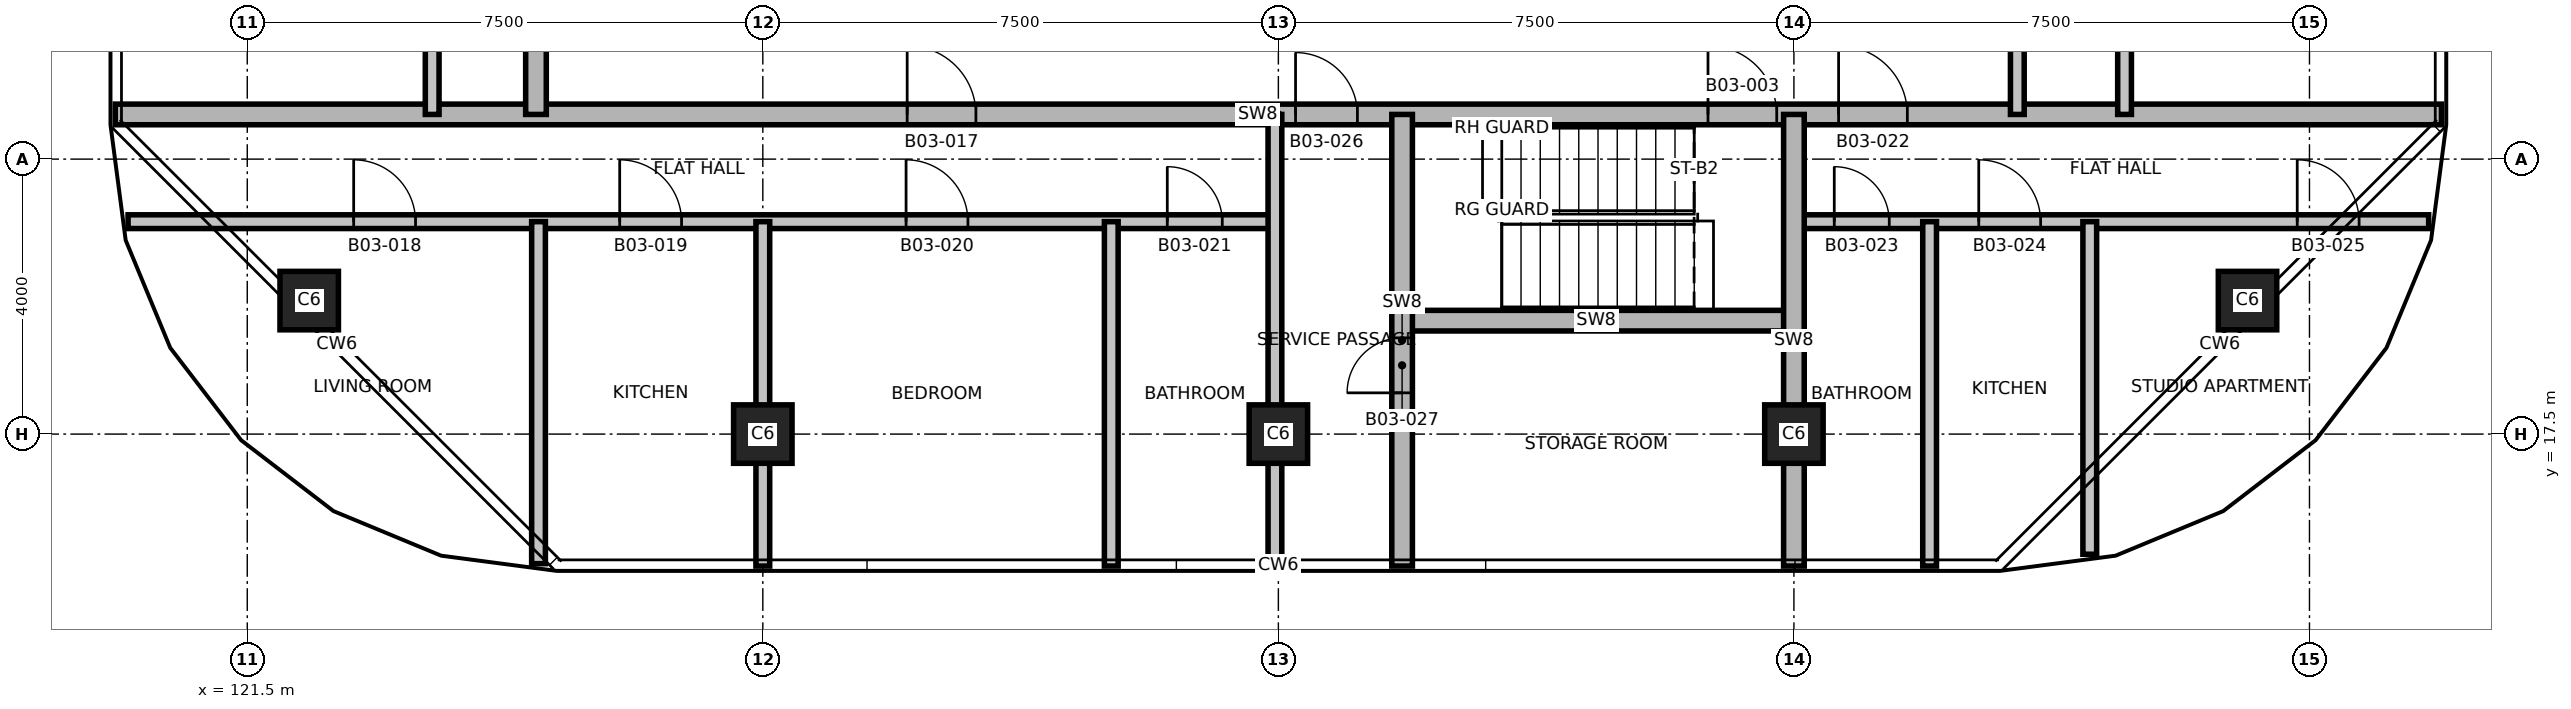
"""IFC4 building model, lengths in metres.
Left out: names, types, materials, properties, quantities, classifications, styles, units other than length and angle.
Written with IfcOpenShell. Run it as: python <this file> out.ifc"""

import sys

from ifc_helpers import new_model, si_unit, direction, frame, frame_2d, origin, origin_2d, place, context, subcontext, project, spatial, rectangle, extrude, element, fill, save


model = new_model("IFC4")
c1 = context("Model", 3, precision=1e-05, world=origin(), true_north=direction((0.0, 1.0)))
c2 = subcontext(c1, "Body", "Model", "MODEL_VIEW")
j1 = project(units=[si_unit("LENGTHUNIT", "METRE"), si_unit("PLANEANGLEUNIT", "RADIAN")], contexts=[c1])
p1 = place(None, origin())
s1 = spatial("IfcSite", under=j1, at=p1, CompositionType="ELEMENT")
p2 = place(p1, origin())
s2 = spatial("IfcBuilding", under=s1, at=p2, CompositionType="ELEMENT")
p3 = place(p2, frame((0.0, 0.0, 59.4)))
s3 = spatial("IfcBuildingStorey", under=s2, at=p3, CompositionType="ELEMENT", Elevation=59.4)
for number, where, z_axis, x_axis in (
    (1, (129.0, 17.5, 0.0), (0.0, 0.0, 1.0), (1.0, 0.0, 0.0)),
    (2, (136.5, 17.5, 0.0), (0.0, 0.0, 1.0), (1.0, 0.0, 0.0)),
    (3, (144.0, 17.5, 0.0), (0.0, 0.0, 1.0), (1.0, 0.0, 0.0)),
    (4, (122.401, 19.442, 0.0), (0.0, 0.0, 1.0), (1.0, 0.0, 0.0)),
    (5, (150.599, 19.442, 0.0), (0.0, 0.0, 1.0), (1.0, 0.0, 0.0)),
):
    element("IfcColumn", number, at=place(p3, frame(where, z_axis=z_axis, x_axis=x_axis)), inside=s3, PredefinedType="COLUMN", context=c2, shape_type="SweptSolid", body=[
        extrude(rectangle(XDim=0.85, YDim=0.85, at=origin_2d()), origin(), (0.0, 0.0, 1.0), 3.7),
    ])
p4 = place(p3, frame((138.25, 19.15, 0.0), z_axis=(0.0, 0.0, 1.0), x_axis=(1.0, 0.0, 0.0)))
e6 = element("IfcWall", 6, at=p4, inside=s3, PredefinedType="SHEAR", context=c2, shape_type="SweptSolid", body=[
    extrude(rectangle(XDim=5.75, YDim=0.3, at=frame_2d((2.875, 0.0))), origin(), (0.0, 0.0, 1.0), 3.4),
])
p5 = place(p3, frame((119.766, 20.59, 0.0), z_axis=(0.0, 0.0, 1.0), x_axis=(1.0, 0.0, 0.0)))
e7 = element("IfcWall", 7, at=p5, inside=s3, PredefinedType="PARTITIONING", context=c2, shape_type="SweptSolid", body=[
    extrude(rectangle(XDim=16.734, YDim=0.2, at=frame_2d((8.367, 0.0))), origin(), (0.0, 0.0, 1.0), 3.4),
])
p6 = place(p5, frame((3.282, 0.0, 0.0)))
e8 = element("IfcOpeningElement", 8, at=p6, cuts=e7, PredefinedType="OPENING", context=c2, shape_type="SweptSolid", body=[
    extrude(rectangle(XDim=0.9, YDim=2.1, at=frame_2d((0.45, 1.05))), frame((0.0, 0.11, 0.0), z_axis=(0.0, -1.0, 0.0), x_axis=(1.0, 0.0, 0.0)), (0.0, 0.0, 1.0), 0.22),
])
p7 = place(p5, frame((7.152, 0.0, 0.0)))
e9 = element("IfcOpeningElement", 9, at=p7, cuts=e7, PredefinedType="OPENING", context=c2, shape_type="SweptSolid", body=[
    extrude(rectangle(XDim=0.9, YDim=2.1, at=frame_2d((0.45, 1.05))), frame((0.0, 0.11, 0.0), z_axis=(0.0, -1.0, 0.0), x_axis=(1.0, 0.0, 0.0)), (0.0, 0.0, 1.0), 0.22),
])
p8 = place(p5, frame((11.318, 0.0, 0.0)))
e10 = element("IfcOpeningElement", 10, at=p8, cuts=e7, PredefinedType="OPENING", context=c2, shape_type="SweptSolid", body=[
    extrude(rectangle(XDim=0.9, YDim=2.1, at=frame_2d((0.45, 1.05))), frame((0.0, 0.11, 0.0), z_axis=(0.0, -1.0, 0.0), x_axis=(1.0, 0.0, 0.0)), (0.0, 0.0, 1.0), 0.22),
])
p9 = place(p5, frame((15.118, 0.0, 0.0)))
e11 = element("IfcOpeningElement", 11, at=p9, cuts=e7, PredefinedType="OPENING", context=c2, shape_type="SweptSolid", body=[
    extrude(rectangle(XDim=0.8, YDim=2.1, at=frame_2d((0.4, 1.05))), frame((0.0, 0.11, 0.0), z_axis=(0.0, -1.0, 0.0), x_axis=(1.0, 0.0, 0.0)), (0.0, 0.0, 1.0), 0.22),
])
p10 = place(p3, frame((144.0, 20.59, 0.0), z_axis=(0.0, 0.0, 1.0), x_axis=(1.0, 0.0, 0.0)))
e12 = element("IfcWall", 12, at=p10, inside=s3, PredefinedType="PARTITIONING", context=c2, shape_type="SweptSolid", body=[
    extrude(rectangle(XDim=9.234, YDim=0.2, at=frame_2d((4.617, 0.0))), origin(), (0.0, 0.0, 1.0), 3.4),
])
p11 = place(p10, frame((0.587, 0.0, 0.0)))
e13 = element("IfcOpeningElement", 13, at=p11, cuts=e12, PredefinedType="OPENING", context=c2, shape_type="SweptSolid", body=[
    extrude(rectangle(XDim=0.8, YDim=2.1, at=frame_2d((0.4, 1.05))), frame((0.0, 0.11, 0.0), z_axis=(0.0, -1.0, 0.0), x_axis=(1.0, 0.0, 0.0)), (0.0, 0.0, 1.0), 0.22),
])
p12 = place(p10, frame((2.689, 0.0, 0.0)))
e14 = element("IfcOpeningElement", 14, at=p12, cuts=e12, PredefinedType="OPENING", context=c2, shape_type="SweptSolid", body=[
    extrude(rectangle(XDim=0.9, YDim=2.1, at=frame_2d((0.45, 1.05))), frame((0.0, 0.11, 0.0), z_axis=(0.0, -1.0, 0.0), x_axis=(1.0, 0.0, 0.0)), (0.0, 0.0, 1.0), 0.22),
])
p13 = place(p10, frame((7.322, 0.0, 0.0)))
e15 = element("IfcOpeningElement", 15, at=p13, cuts=e12, PredefinedType="OPENING", context=c2, shape_type="SweptSolid", body=[
    extrude(rectangle(XDim=0.9, YDim=2.1, at=frame_2d((0.45, 1.05))), frame((0.0, 0.11, 0.0), z_axis=(0.0, -1.0, 0.0), x_axis=(1.0, 0.0, 0.0)), (0.0, 0.0, 1.0), 0.22),
])
p14 = place(p3, frame((119.58, 22.15, 0.0), z_axis=(0.0, 0.0, 1.0), x_axis=(1.0, 0.0, 0.0)))
e16 = element("IfcWall", 16, at=p14, inside=s3, PredefinedType="SHEAR", context=c2, shape_type="SweptSolid", body=[
    extrude(rectangle(XDim=33.84, YDim=0.3, at=frame_2d((16.92, 0.0))), origin(), (0.0, 0.0, 1.0), 3.4),
])
p15 = place(p14, frame((23.17, 0.0, 0.0)))
e17 = element("IfcOpeningElement", 17, at=p15, cuts=e16, PredefinedType="OPENING", context=c2, shape_type="SweptSolid", body=[
    extrude(rectangle(XDim=1.0, YDim=2.1, at=frame_2d((0.5, 1.05))), frame((0.0, 0.16, 0.0), z_axis=(0.0, -1.0, 0.0), x_axis=(1.0, 0.0, 0.0)), (0.0, 0.0, 1.0), 0.32),
])
p16 = place(p14, frame((11.52, 0.0, 0.0)))
e18 = element("IfcOpeningElement", 18, at=p16, cuts=e16, PredefinedType="OPENING", context=c2, shape_type="SweptSolid", body=[
    extrude(rectangle(XDim=1.0, YDim=2.1, at=frame_2d((0.5, 1.05))), frame((0.0, 0.16, 0.0), z_axis=(0.0, -1.0, 0.0), x_axis=(1.0, 0.0, 0.0)), (0.0, 0.0, 1.0), 0.32),
])
p17 = place(p14, frame((25.07, 0.0, 0.0)))
e19 = element("IfcOpeningElement", 19, at=p17, cuts=e16, PredefinedType="OPENING", context=c2, shape_type="SweptSolid", body=[
    extrude(rectangle(XDim=1.0, YDim=2.1, at=frame_2d((0.5, 1.05))), frame((0.0, 0.16, 0.0), z_axis=(0.0, -1.0, 0.0), x_axis=(1.0, 0.0, 0.0)), (0.0, 0.0, 1.0), 0.32),
])
p18 = place(p14, frame((17.17, 0.0, 0.0)))
e20 = element("IfcOpeningElement", 20, at=p18, cuts=e16, PredefinedType="OPENING", context=c2, shape_type="SweptSolid", body=[
    extrude(rectangle(XDim=0.9, YDim=2.1, at=frame_2d((0.45, 1.05))), frame((0.0, 0.16, 0.0), z_axis=(0.0, -1.0, 0.0), x_axis=(1.0, 0.0, 0.0)), (0.0, 0.0, 1.0), 0.32),
])
p19 = place(p3, frame((124.19, 22.15, 0.0), z_axis=(0.0, 0.0, 1.0), x_axis=(0.0, 1.0, 0.0)))
e21 = element("IfcWall", 21, at=p19, inside=s3, PredefinedType="PARTITIONING", context=c2, shape_type="SweptSolid", body=[
    extrude(rectangle(XDim=17.7, YDim=0.2, at=frame_2d((8.85, 0.0))), origin(), (0.0, 0.0, 1.0), 3.4),
])
p20 = place(p19, frame((1.028, 0.0, 0.0)))
e22 = element("IfcOpeningElement", 22, at=p20, cuts=e21, PredefinedType="OPENING", context=c2, shape_type="SweptSolid", body=[
    extrude(rectangle(XDim=0.9, YDim=2.1, at=frame_2d((0.45, 1.05))), frame((0.0, 0.11, 0.0), z_axis=(0.0, -1.0, 0.0), x_axis=(1.0, 0.0, 0.0)), (0.0, 0.0, 1.0), 0.22),
])
p21 = place(p19, frame((3.253, 0.0, 0.0)))
e23 = element("IfcOpeningElement", 23, at=p21, cuts=e21, PredefinedType="OPENING", context=c2, shape_type="SweptSolid", body=[
    extrude(rectangle(XDim=0.8, YDim=2.1, at=frame_2d((0.4, 1.05))), frame((0.0, 0.11, 0.0), z_axis=(0.0, -1.0, 0.0), x_axis=(1.0, 0.0, 0.0)), (0.0, 0.0, 1.0), 0.22),
])
p22 = place(p19, frame((6.867, 0.0, 0.0)))
e24 = element("IfcOpeningElement", 24, at=p22, cuts=e21, PredefinedType="OPENING", context=c2, shape_type="SweptSolid", body=[
    extrude(rectangle(XDim=0.9, YDim=2.1, at=frame_2d((0.45, 1.05))), frame((0.0, 0.11, 0.0), z_axis=(0.0, -1.0, 0.0), x_axis=(1.0, 0.0, 0.0)), (0.0, 0.0, 1.0), 0.22),
])
p23 = place(p19, frame((11.367, 0.0, 0.0)))
e25 = element("IfcOpeningElement", 25, at=p23, cuts=e21, PredefinedType="OPENING", context=c2, shape_type="SweptSolid", body=[
    extrude(rectangle(XDim=0.9, YDim=2.1, at=frame_2d((0.45, 1.05))), frame((0.0, 0.11, 0.0), z_axis=(0.0, -1.0, 0.0), x_axis=(1.0, 0.0, 0.0)), (0.0, 0.0, 1.0), 0.22),
])
p24 = place(p19, frame((15.075, 0.0, 0.0)))
e26 = element("IfcOpeningElement", 26, at=p24, cuts=e21, PredefinedType="OPENING", context=c2, shape_type="SweptSolid", body=[
    extrude(rectangle(XDim=0.9, YDim=2.1, at=frame_2d((0.45, 1.05))), frame((0.0, 0.11, 0.0), z_axis=(0.0, -1.0, 0.0), x_axis=(1.0, 0.0, 0.0)), (0.0, 0.0, 1.0), 0.22),
])
p25 = place(p3, frame((125.7, 22.15, 0.0), z_axis=(0.0, 0.0, 1.0), x_axis=(0.0, 1.0, 0.0)))
e27 = element("IfcWall", 27, at=p25, inside=s3, PredefinedType="SHEAR", context=c2, shape_type="SweptSolid", body=[
    extrude(rectangle(XDim=17.7, YDim=0.3, at=frame_2d((8.85, 0.0))), origin(), (0.0, 0.0, 1.0), 3.4),
])
p26 = place(p25, frame((2.7, 0.0, 0.0)))
e28 = element("IfcOpeningElement", 28, at=p26, cuts=e27, PredefinedType="OPENING", context=c2, shape_type="SweptSolid", body=[
    extrude(rectangle(XDim=1.0, YDim=2.1, at=frame_2d((0.5, 1.05))), frame((0.0, 0.16, 0.0), z_axis=(0.0, -1.0, 0.0), x_axis=(1.0, 0.0, 0.0)), (0.0, 0.0, 1.0), 0.32),
])
p27 = place(p3, frame((125.737, 15.615, 0.0), z_axis=(0.0, 0.0, 1.0), x_axis=(0.0, 1.0, 0.0)))
e29 = element("IfcWall", 29, at=p27, inside=s3, PredefinedType="PARTITIONING", context=c2, shape_type="SweptSolid", body=[
    extrude(rectangle(XDim=4.975, YDim=0.2, at=frame_2d((2.488, 0.0))), origin(), (0.0, 0.0, 1.0), 3.4),
])
for number, where, z_axis, x_axis in (
    (30, (129.0, 15.58, 0.0), (0.0, 0.0, 1.0), (0.0, 1.0, 0.0)),
    (31, (134.069, 15.58, 0.0), (0.0, 0.0, 1.0), (0.0, 1.0, 0.0)),
):
    element("IfcWall", number, at=place(p3, frame(where, z_axis=z_axis, x_axis=x_axis)), inside=s3, PredefinedType="PARTITIONING", context=c2, shape_type="SweptSolid", body=[
        extrude(rectangle(XDim=5.01, YDim=0.2, at=frame_2d((2.505, 0.0))), origin(), (0.0, 0.0, 1.0), 3.4),
    ])
p28 = place(p3, frame((136.45, 15.58, 0.0), z_axis=(0.0, 0.0, 1.0), x_axis=(0.0, 1.0, 0.0)))
e32 = element("IfcWall", 32, at=p28, inside=s3, PredefinedType="PARTITIONING", context=c2, shape_type="SweptSolid", body=[
    extrude(rectangle(XDim=6.57, YDim=0.2, at=frame_2d((3.285, 0.0))), origin(), (0.0, 0.0, 1.0), 3.4),
])
p29 = place(p3, frame((138.3, 15.58, 0.0), z_axis=(0.0, 0.0, 1.0), x_axis=(0.0, 1.0, 0.0)))
e33 = element("IfcWall", 33, at=p29, inside=s3, PredefinedType="SHEAR", context=c2, shape_type="SweptSolid", body=[
    extrude(rectangle(XDim=6.57, YDim=0.3, at=frame_2d((3.285, 0.0))), origin(), (0.0, 0.0, 1.0), 3.4),
])
p30 = place(p29, frame((2.52, 0.0, 0.0)))
e34 = element("IfcOpeningElement", 34, at=p30, cuts=e33, PredefinedType="OPENING", context=c2, shape_type="SweptSolid", body=[
    extrude(rectangle(XDim=0.8, YDim=2.1, at=frame_2d((0.4, 1.05))), frame((0.0, 0.16, 0.0), z_axis=(0.0, -1.0, 0.0), x_axis=(1.0, 0.0, 0.0)), (0.0, 0.0, 1.0), 0.32),
])
p31 = place(p3, frame((144.0, 15.58, 0.0), z_axis=(0.0, 0.0, 1.0), x_axis=(0.0, 1.0, 0.0)))
e35 = element("IfcWall", 35, at=p31, inside=s3, PredefinedType="SHEAR", context=c2, shape_type="SweptSolid", body=[
    extrude(rectangle(XDim=6.57, YDim=0.3, at=frame_2d((3.285, 0.0))), origin(), (0.0, 0.0, 1.0), 3.4),
])
p32 = place(p3, frame((145.974, 15.58, 0.0), z_axis=(0.0, 0.0, 1.0), x_axis=(0.0, 1.0, 0.0)))
e36 = element("IfcWall", 36, at=p32, inside=s3, PredefinedType="PARTITIONING", context=c2, shape_type="SweptSolid", body=[
    extrude(rectangle(XDim=5.01, YDim=0.2, at=frame_2d((2.505, 0.0))), origin(), (0.0, 0.0, 1.0), 3.4),
])
p33 = place(p3, frame((147.25, 22.15, 0.0), z_axis=(0.0, 0.0, 1.0), x_axis=(0.0, 1.0, 0.0)))
e37 = element("IfcWall", 37, at=p33, inside=s3, PredefinedType="PARTITIONING", context=c2, shape_type="SweptSolid", body=[
    extrude(rectangle(XDim=17.7, YDim=0.2, at=frame_2d((8.85, 0.0))), origin(), (0.0, 0.0, 1.0), 3.4),
])
p34 = place(p33, frame((2.65, 0.0, 0.0)))
e38 = element("IfcOpeningElement", 38, at=p34, cuts=e37, PredefinedType="OPENING", context=c2, shape_type="SweptSolid", body=[
    extrude(rectangle(XDim=1.0, YDim=2.1, at=frame_2d((0.5, 1.05))), frame((0.0, 0.11, 0.0), z_axis=(0.0, -1.0, 0.0), x_axis=(1.0, 0.0, 0.0)), (0.0, 0.0, 1.0), 0.22),
])
p35 = place(p3, frame((148.304, 15.752, 0.0), z_axis=(0.0, 0.0, 1.0), x_axis=(0.0, 1.0, 0.0)))
e39 = element("IfcWall", 39, at=p35, inside=s3, PredefinedType="PARTITIONING", context=c2, shape_type="SweptSolid", body=[
    extrude(rectangle(XDim=4.838, YDim=0.2, at=frame_2d((2.419, 0.0))), origin(), (0.0, 0.0, 1.0), 3.4),
])
p36 = place(p3, frame((148.81, 22.15, 0.0), z_axis=(0.0, 0.0, 1.0), x_axis=(0.0, 1.0, 0.0)))
e40 = element("IfcWall", 40, at=p36, inside=s3, PredefinedType="PARTITIONING", context=c2, shape_type="SweptSolid", body=[
    extrude(rectangle(XDim=17.7, YDim=0.2, at=frame_2d((8.85, 0.0))), origin(), (0.0, 0.0, 1.0), 3.4),
])
p37 = place(p36, frame((1.725, 0.0, 0.0)))
e41 = element("IfcOpeningElement", 41, at=p37, cuts=e40, PredefinedType="OPENING", context=c2, shape_type="SweptSolid", body=[
    extrude(rectangle(XDim=0.9, YDim=2.1, at=frame_2d((0.45, 1.05))), frame((0.0, 0.11, 0.0), z_axis=(0.0, -1.0, 0.0), x_axis=(1.0, 0.0, 0.0)), (0.0, 0.0, 1.0), 0.22),
])
p38 = place(p36, frame((6.867, 0.0, 0.0)))
e42 = element("IfcOpeningElement", 42, at=p38, cuts=e40, PredefinedType="OPENING", context=c2, shape_type="SweptSolid", body=[
    extrude(rectangle(XDim=0.9, YDim=2.1, at=frame_2d((0.45, 1.05))), frame((0.0, 0.11, 0.0), z_axis=(0.0, -1.0, 0.0), x_axis=(1.0, 0.0, 0.0)), (0.0, 0.0, 1.0), 0.22),
])
p39 = place(p36, frame((11.367, 0.0, 0.0)))
e43 = element("IfcOpeningElement", 43, at=p39, cuts=e40, PredefinedType="OPENING", context=c2, shape_type="SweptSolid", body=[
    extrude(rectangle(XDim=0.9, YDim=2.1, at=frame_2d((0.45, 1.05))), frame((0.0, 0.11, 0.0), z_axis=(0.0, -1.0, 0.0), x_axis=(1.0, 0.0, 0.0)), (0.0, 0.0, 1.0), 0.22),
])
p40 = place(p36, frame((14.378, 0.0, 0.0)))
e44 = element("IfcOpeningElement", 44, at=p40, cuts=e40, PredefinedType="OPENING", context=c2, shape_type="SweptSolid", body=[
    extrude(rectangle(XDim=0.9, YDim=2.1, at=frame_2d((0.45, 1.05))), frame((0.0, 0.11, 0.0), z_axis=(0.0, -1.0, 0.0), x_axis=(1.0, 0.0, 0.0)), (0.0, 0.0, 1.0), 0.22),
])
p41 = place(p36, frame((16.603, 0.0, 0.0)))
e45 = element("IfcOpeningElement", 45, at=p41, cuts=e40, PredefinedType="OPENING", context=c2, shape_type="SweptSolid", body=[
    extrude(rectangle(XDim=0.8, YDim=2.1, at=frame_2d((0.4, 1.05))), frame((0.0, 0.11, 0.0), z_axis=(0.0, -1.0, 0.0), x_axis=(1.0, 0.0, 0.0)), (0.0, 0.0, 1.0), 0.22),
])
p42 = place(p15, origin())
e46 = element("IfcDoor", 46, at=p42, inside=s3, OperationType="SINGLE_SWING_LEFT", PredefinedType="DOOR", context=c2, shape_type="SweptSolid", body=[
    extrude(rectangle(XDim=1.0, YDim=2.1, at=frame_2d((0.5, 1.05))), frame((0.0, 0.025, 0.0), z_axis=(0.0, -1.0, 0.0), x_axis=(1.0, 0.0, 0.0)), (0.0, 0.0, 1.0), 0.05),
])
fill(e17, e46)
p43 = place(p16, origin())
e47 = element("IfcDoor", 47, at=p43, inside=s3, OperationType="SINGLE_SWING_LEFT", PredefinedType="DOOR", context=c2, shape_type="SweptSolid", body=[
    extrude(rectangle(XDim=1.0, YDim=2.1, at=frame_2d((0.5, 1.05))), frame((0.0, 0.025, 0.0), z_axis=(0.0, -1.0, 0.0), x_axis=(1.0, 0.0, 0.0)), (0.0, 0.0, 1.0), 0.05),
])
fill(e18, e47)
p44 = place(p6, origin())
e48 = element("IfcDoor", 48, at=p44, inside=s3, OperationType="SINGLE_SWING_RIGHT", PredefinedType="DOOR", context=c2, shape_type="SweptSolid", body=[
    extrude(rectangle(XDim=0.9, YDim=2.1, at=frame_2d((0.45, 1.05))), frame((0.0, 0.025, 0.0), z_axis=(0.0, -1.0, 0.0), x_axis=(1.0, 0.0, 0.0)), (0.0, 0.0, 1.0), 0.05),
])
fill(e8, e48)
p45 = place(p7, origin())
e49 = element("IfcDoor", 49, at=p45, inside=s3, OperationType="SINGLE_SWING_LEFT", PredefinedType="DOOR", context=c2, shape_type="SweptSolid", body=[
    extrude(rectangle(XDim=0.9, YDim=2.1, at=frame_2d((0.45, 1.05))), frame((0.0, 0.025, 0.0), z_axis=(0.0, -1.0, 0.0), x_axis=(1.0, 0.0, 0.0)), (0.0, 0.0, 1.0), 0.05),
])
fill(e9, e49)
p46 = place(p8, origin())
e50 = element("IfcDoor", 50, at=p46, inside=s3, OperationType="SINGLE_SWING_RIGHT", PredefinedType="DOOR", context=c2, shape_type="SweptSolid", body=[
    extrude(rectangle(XDim=0.9, YDim=2.1, at=frame_2d((0.45, 1.05))), frame((0.0, 0.025, 0.0), z_axis=(0.0, -1.0, 0.0), x_axis=(1.0, 0.0, 0.0)), (0.0, 0.0, 1.0), 0.05),
])
fill(e10, e50)
p47 = place(p9, origin())
e51 = element("IfcDoor", 51, at=p47, inside=s3, OperationType="SINGLE_SWING_LEFT", PredefinedType="DOOR", context=c2, shape_type="SweptSolid", body=[
    extrude(rectangle(XDim=0.8, YDim=2.1, at=frame_2d((0.4, 1.05))), frame((0.0, 0.025, 0.0), z_axis=(0.0, -1.0, 0.0), x_axis=(1.0, 0.0, 0.0)), (0.0, 0.0, 1.0), 0.05),
])
fill(e11, e51)
p48 = place(p17, origin())
e52 = element("IfcDoor", 52, at=p48, inside=s3, OperationType="SINGLE_SWING_RIGHT", PredefinedType="DOOR", context=c2, shape_type="SweptSolid", body=[
    extrude(rectangle(XDim=1.0, YDim=2.1, at=frame_2d((0.5, 1.05))), frame((0.0, 0.025, 0.0), z_axis=(0.0, -1.0, 0.0), x_axis=(1.0, 0.0, 0.0)), (0.0, 0.0, 1.0), 0.05),
])
fill(e19, e52)
p49 = place(p11, origin())
e53 = element("IfcDoor", 53, at=p49, inside=s3, OperationType="SINGLE_SWING_LEFT", PredefinedType="DOOR", context=c2, shape_type="SweptSolid", body=[
    extrude(rectangle(XDim=0.8, YDim=2.1, at=frame_2d((0.4, 1.05))), frame((0.0, 0.025, 0.0), z_axis=(0.0, -1.0, 0.0), x_axis=(1.0, 0.0, 0.0)), (0.0, 0.0, 1.0), 0.05),
])
fill(e13, e53)
p50 = place(p12, origin())
e54 = element("IfcDoor", 54, at=p50, inside=s3, OperationType="SINGLE_SWING_RIGHT", PredefinedType="DOOR", context=c2, shape_type="SweptSolid", body=[
    extrude(rectangle(XDim=0.9, YDim=2.1, at=frame_2d((0.45, 1.05))), frame((0.0, 0.025, 0.0), z_axis=(0.0, -1.0, 0.0), x_axis=(1.0, 0.0, 0.0)), (0.0, 0.0, 1.0), 0.05),
])
fill(e14, e54)
p51 = place(p13, origin())
e55 = element("IfcDoor", 55, at=p51, inside=s3, OperationType="SINGLE_SWING_LEFT", PredefinedType="DOOR", context=c2, shape_type="SweptSolid", body=[
    extrude(rectangle(XDim=0.9, YDim=2.1, at=frame_2d((0.45, 1.05))), frame((0.0, 0.025, 0.0), z_axis=(0.0, -1.0, 0.0), x_axis=(1.0, 0.0, 0.0)), (0.0, 0.0, 1.0), 0.05),
])
fill(e15, e55)
p52 = place(p18, origin())
e56 = element("IfcDoor", 56, at=p52, inside=s3, OperationType="SINGLE_SWING_RIGHT", PredefinedType="DOOR", context=c2, shape_type="SweptSolid", body=[
    extrude(rectangle(XDim=0.9, YDim=2.1, at=frame_2d((0.45, 1.05))), frame((0.0, 0.025, 0.0), z_axis=(0.0, -1.0, 0.0), x_axis=(1.0, 0.0, 0.0)), (0.0, 0.0, 1.0), 0.05),
])
fill(e20, e56)
p53 = place(p30, origin())
e57 = element("IfcDoor", 57, at=p53, inside=s3, OperationType="SINGLE_SWING_LEFT", PredefinedType="DOOR", context=c2, shape_type="SweptSolid", body=[
    extrude(rectangle(XDim=0.8, YDim=2.1, at=frame_2d((0.4, 1.05))), frame((0.0, 0.025, 0.0), z_axis=(0.0, -1.0, 0.0), x_axis=(1.0, 0.0, 0.0)), (0.0, 0.0, 1.0), 0.05),
])
fill(e34, e57)
save(model, sys.argv[1])
